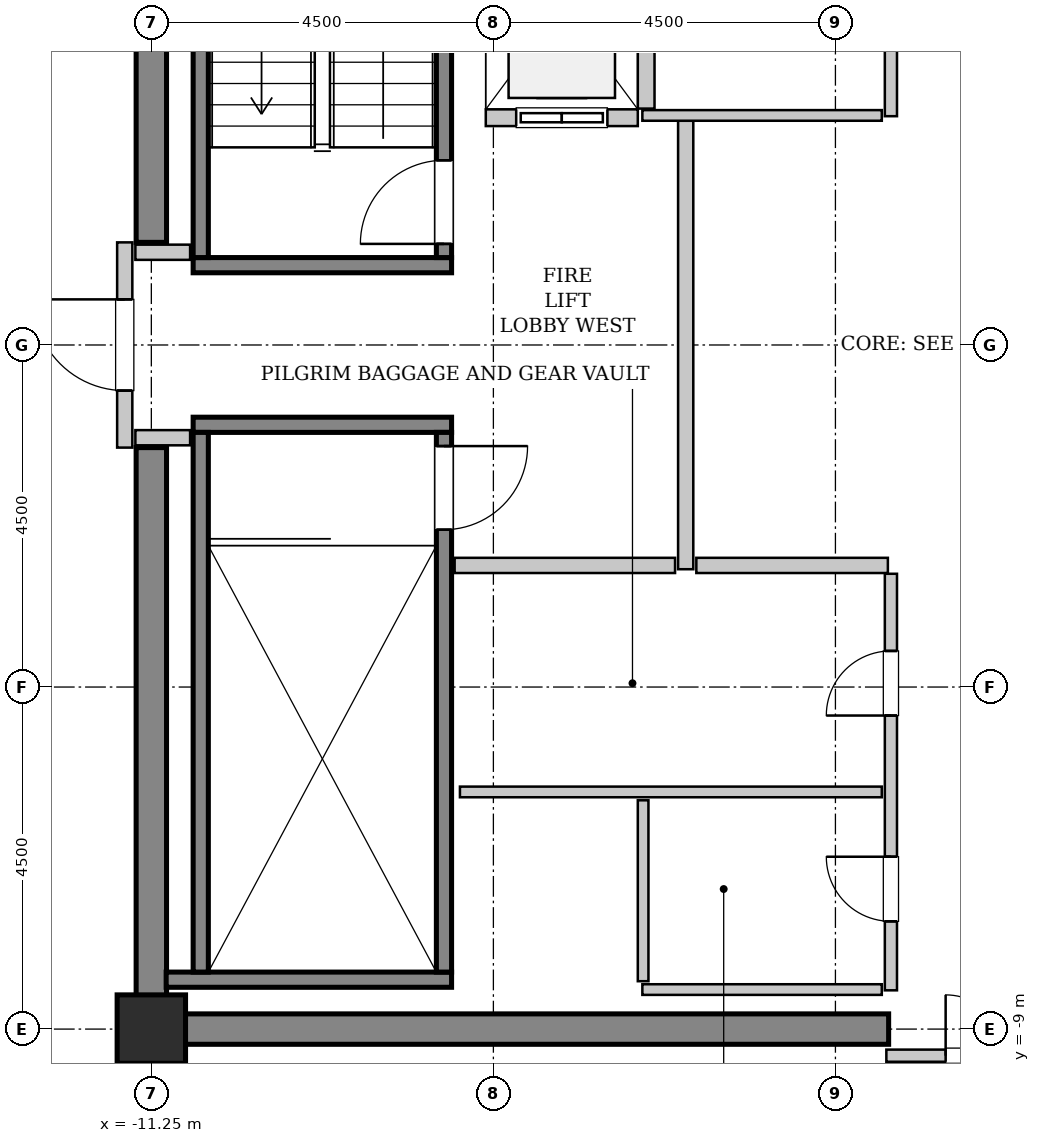
"""IFC4 building model, lengths in metres.
Left out: names, types, materials, properties, quantities, classifications, styles, units other than length and angle.
Written with IfcOpenShell. Run it as: python <this file> out.ifc"""

import sys

from ifc_helpers import new_model, si_unit, direction, frame, frame_2d, origin, origin_2d, place, context, subcontext, project, spatial, rectangle, extrude, source, transform, mapped, element, fill, save


model = new_model("IFC4")
c1 = context("Model", 3, precision=1e-05, world=origin(), true_north=direction((0.0, 1.0)))
c2 = subcontext(c1, "Body", "Model", "MODEL_VIEW")
j1 = project(units=[si_unit("LENGTHUNIT", "METRE"), si_unit("PLANEANGLEUNIT", "RADIAN")], contexts=[c1])
p1 = place(None, origin())
s1 = spatial("IfcSite", under=j1, at=p1, CompositionType="ELEMENT")
p2 = place(p1, origin())
s2 = spatial("IfcBuilding", under=s1, at=p2, CompositionType="ELEMENT")
p3 = place(p2, frame((0.0, 0.0, 353.8)))
s3 = spatial("IfcBuildingStorey", under=s2, at=p3, CompositionType="ELEMENT", Elevation=353.8)
m1 = source(origin(), c2, "Body", "SweptSolid", [
    extrude(rectangle(XDim=9.9, YDim=0.4, at=frame_2d((4.95, 0.0))), origin(), (0.0, 0.0, 1.0), 4.8),
])
p4 = place(p3, frame((-11.45, -9.0, 0.0), z_axis=(0.0, 0.0, 1.0), x_axis=(1.0, 0.0, 0.0)))
e1 = element("IfcWall", 1, at=p4, inside=s3, PredefinedType="SHEAR", context=c2, shape_type="MappedRepresentation", body=[
    mapped(m1, transform((0.0, 0.0, 0.0), x_axis=(1.0, 0.0, 0.0), y_axis=(0.0, 1.0, 0.0), z_axis=(0.0, 0.0, 1.0), scale=1.0)),
])
m2 = source(origin(), c2, "Body", "SweptSolid", [
    extrude(rectangle(XDim=7.45, YDim=0.4, at=frame_2d((3.725, 0.0))), origin(), (0.0, 0.0, 1.0), 4.8),
])
for number, where, z_axis, x_axis in (
    (2, (-11.25, -8.8, 0.0), (0.0, 0.0, 1.0), (0.0, 1.0, 0.0)),
    (3, (-11.25, 1.35, 0.0), (0.0, 0.0, 1.0), (0.0, 1.0, 0.0)),
):
    element("IfcWall", number, at=place(p3, frame(where, z_axis=z_axis, x_axis=x_axis)), inside=s3, PredefinedType="SHEAR", context=c2, shape_type="MappedRepresentation", body=[
        mapped(m2, transform((0.0, 0.0, 0.0), x_axis=(1.0, 0.0, 0.0), y_axis=(0.0, 1.0, 0.0), z_axis=(0.0, 0.0, 1.0), scale=1.0)),
    ])
m3 = source(origin(), c2, "Body", "SweptSolid", [
    extrude(rectangle(XDim=0.9, YDim=0.9, at=origin_2d()), origin(), (0.0, 0.0, 1.0), 4.8),
])
p5 = place(p3, frame((-11.25, -9.0, 0.0), z_axis=(0.0, 0.0, 1.0), x_axis=(1.0, 0.0, 0.0)))
e4 = element("IfcColumn", 4, at=p5, inside=s3, PredefinedType="COLUMN", context=c2, shape_type="MappedRepresentation", body=[
    mapped(m3, transform((0.0, 0.0, 0.0), x_axis=(1.0, 0.0, 0.0), y_axis=(0.0, 1.0, 0.0), z_axis=(0.0, 0.0, 1.0), scale=1.0)),
])
m4 = source(origin(), c2, "Body", "SweptSolid", [
    extrude(rectangle(XDim=3.4, YDim=0.2, at=frame_2d((1.7, 0.0))), origin(), (0.0, 0.0, 1.0), 4.8),
])
p6 = place(p3, frame((-7.3, 1.05, 0.0), z_axis=(0.0, 0.0, 1.0), x_axis=(-1.0, 0.0, 0.0)))
e5 = element("IfcWall", 5, at=p6, inside=s3, PredefinedType="SOLIDWALL", context=c2, shape_type="MappedRepresentation", body=[
    mapped(m4, transform((0.0, 0.0, 0.0), x_axis=(1.0, 0.0, 0.0), y_axis=(0.0, 1.0, 0.0), z_axis=(0.0, 0.0, 1.0), scale=1.0)),
])
m5 = source(origin(), c2, "Body", "SweptSolid", [
    extrude(rectangle(XDim=7.1, YDim=0.2, at=frame_2d((3.55, 0.0))), origin(), (0.0, 0.0, 1.0), 4.8),
])
p7 = place(p3, frame((-7.4, 1.15, 0.0), z_axis=(0.0, 0.0, 1.0), x_axis=(0.0, 1.0, 0.0)))
e6 = element("IfcWall", 6, at=p7, inside=s3, PredefinedType="SOLIDWALL", context=c2, shape_type="MappedRepresentation", body=[
    mapped(m5, transform((0.0, 0.0, 0.0), x_axis=(1.0, 0.0, 0.0), y_axis=(0.0, 1.0, 0.0), z_axis=(0.0, 0.0, 1.0), scale=1.0)),
])
p8 = place(p7, frame((0.18, 0.0, 0.0)))
e7 = element("IfcOpeningElement", 7, at=p8, cuts=e6, PredefinedType="OPENING", context=c2, shape_type="SweptSolid", body=[
    extrude(rectangle(XDim=1.1, YDim=2.15, at=frame_2d((0.55, 1.075))), frame((0.0, 0.11, 0.0), z_axis=(0.0, -1.0, 0.0), x_axis=(1.0, 0.0, 0.0)), (0.0, 0.0, 1.0), 0.22),
])
p9 = place(p3, frame((-10.6, 1.15, 0.0), z_axis=(0.0, 0.0, 1.0), x_axis=(0.0, 1.0, 0.0)))
e8 = element("IfcWall", 8, at=p9, inside=s3, PredefinedType="SOLIDWALL", context=c2, shape_type="MappedRepresentation", body=[
    mapped(m5, transform((0.0, 0.0, 0.0), x_axis=(1.0, 0.0, 0.0), y_axis=(0.0, 1.0, 0.0), z_axis=(0.0, 0.0, 1.0), scale=1.0)),
])
m6 = source(origin(), c2, "Body", "SweptSolid", [
    extrude(rectangle(XDim=3.4, YDim=0.2, at=frame_2d((1.7, 0.0))), origin(), (0.0, 0.0, 1.0), 4.5),
])
p10 = place(p3, frame((-10.7, -1.05, 0.0), z_axis=(0.0, 0.0, 1.0), x_axis=(1.0, 0.0, 0.0)))
e9 = element("IfcWall", 9, at=p10, inside=s3, PredefinedType="SOLIDWALL", context=c2, shape_type="MappedRepresentation", body=[
    mapped(m6, transform((0.0, 0.0, 0.0), x_axis=(1.0, 0.0, 0.0), y_axis=(0.0, 1.0, 0.0), z_axis=(0.0, 0.0, 1.0), scale=1.0)),
])
m7 = source(origin(), c2, "Body", "SweptSolid", [
    extrude(rectangle(XDim=3.755, YDim=0.2, at=frame_2d((1.877, 0.0))), origin(), (0.0, 0.0, 1.0), 4.5),
])
p11 = place(p3, frame((-11.055, -8.35, 0.0), z_axis=(0.0, 0.0, 1.0), x_axis=(1.0, 0.0, 0.0)))
e10 = element("IfcWall", 10, at=p11, inside=s3, PredefinedType="SOLIDWALL", context=c2, shape_type="MappedRepresentation", body=[
    mapped(m7, transform((0.0, 0.0, 0.0), x_axis=(1.0, 0.0, 0.0), y_axis=(0.0, 1.0, 0.0), z_axis=(0.0, 0.0, 1.0), scale=1.0)),
])
m8 = source(origin(), c2, "Body", "SweptSolid", [
    extrude(rectangle(XDim=7.1, YDim=0.2, at=frame_2d((3.55, 0.0))), origin(), (0.0, 0.0, 1.0), 4.5),
])
p12 = place(p3, frame((-10.6, -1.15, 0.0), z_axis=(0.0, 0.0, 1.0), x_axis=(0.0, -1.0, 0.0)))
e11 = element("IfcWall", 11, at=p12, inside=s3, PredefinedType="SOLIDWALL", context=c2, shape_type="MappedRepresentation", body=[
    mapped(m8, transform((0.0, 0.0, 0.0), x_axis=(1.0, 0.0, 0.0), y_axis=(0.0, 1.0, 0.0), z_axis=(0.0, 0.0, 1.0), scale=1.0)),
])
p13 = place(p3, frame((-7.4, -1.15, 0.0), z_axis=(0.0, 0.0, 1.0), x_axis=(0.0, -1.0, 0.0)))
e12 = element("IfcWall", 12, at=p13, inside=s3, PredefinedType="SOLIDWALL", context=c2, shape_type="MappedRepresentation", body=[
    mapped(m8, transform((0.0, 0.0, 0.0), x_axis=(1.0, 0.0, 0.0), y_axis=(0.0, 1.0, 0.0), z_axis=(0.0, 0.0, 1.0), scale=1.0)),
])
p14 = place(p13, frame((0.18, 0.0, 0.0)))
e13 = element("IfcOpeningElement", 13, at=p14, cuts=e12, PredefinedType="OPENING", context=c2, shape_type="SweptSolid", body=[
    extrude(rectangle(XDim=1.1, YDim=2.15, at=frame_2d((0.55, 1.075))), frame((0.0, 0.11, 0.0), z_axis=(0.0, -1.0, 0.0), x_axis=(1.0, 0.0, 0.0)), (0.0, 0.0, 1.0), 0.22),
])
m9 = source(origin(), c2, "Body", "SweptSolid", [
    extrude(rectangle(XDim=2.0, YDim=0.22, at=frame_2d((1.0, 0.0))), origin(), (0.0, 0.0, 1.0), 4.485),
])
p15 = place(p3, frame((-6.85, 2.99, 0.0), z_axis=(0.0, 0.0, 1.0), x_axis=(1.0, 0.0, 0.0)))
e14 = element("IfcWall", 14, at=p15, inside=s3, PredefinedType="SOLIDWALL", context=c2, shape_type="MappedRepresentation", body=[
    mapped(m9, transform((0.0, 0.0, 0.0), x_axis=(1.0, 0.0, 0.0), y_axis=(0.0, 1.0, 0.0), z_axis=(0.0, 0.0, 1.0), scale=1.0)),
])
p16 = place(p15, frame((0.4, 0.0, 0.0)))
e15 = element("IfcOpeningElement", 15, at=p16, cuts=e14, PredefinedType="OPENING", context=c2, shape_type="SweptSolid", body=[
    extrude(rectangle(XDim=1.2, YDim=2.2, at=frame_2d((0.6, 1.1))), frame((0.0, 0.12, 0.0), z_axis=(0.0, -1.0, 0.0), x_axis=(1.0, 0.0, 0.0)), (0.0, 0.0, 1.0), 0.24),
])
m10 = source(origin(), c2, "Body", "SweptSolid", [
    extrude(rectangle(XDim=2.68, YDim=0.22, at=frame_2d((1.34, 0.0))), origin(), (0.0, 0.0, 1.0), 4.485),
])
p17 = place(p3, frame((-4.74, 3.11, 0.0), z_axis=(0.0, 0.0, 1.0), x_axis=(0.0, 1.0, 0.0)))
e16 = element("IfcWall", 16, at=p17, inside=s3, PredefinedType="SOLIDWALL", context=c2, shape_type="MappedRepresentation", body=[
    mapped(m10, transform((0.0, 0.0, 0.0), x_axis=(1.0, 0.0, 0.0), y_axis=(0.0, 1.0, 0.0), z_axis=(0.0, 0.0, 1.0), scale=1.0)),
])
m11 = source(origin(), c2, "Body", "SweptSolid", [
    extrude(rectangle(XDim=2.7, YDim=0.2, at=frame_2d((1.35, 0.0))), origin(), (0.0, 0.0, 1.0), 3.575),
])
p18 = place(p3, frame((-11.6, -1.35, 0.0), z_axis=(0.0, 0.0, 1.0), x_axis=(0.0, 1.0, 0.0)))
e17 = element("IfcWall", 17, at=p18, inside=s3, PredefinedType="PARTITIONING", context=c2, shape_type="MappedRepresentation", body=[
    mapped(m11, transform((0.0, 0.0, 0.0), x_axis=(1.0, 0.0, 0.0), y_axis=(0.0, 1.0, 0.0), z_axis=(0.0, 0.0, 1.0), scale=1.0)),
])
p19 = place(p18, frame((0.75, 0.0, 0.0)))
e18 = element("IfcOpeningElement", 18, at=p19, cuts=e17, PredefinedType="OPENING", context=c2, shape_type="SweptSolid", body=[
    extrude(rectangle(XDim=1.2, YDim=2.15, at=frame_2d((0.6, 1.075))), frame((0.0, 0.11, 0.0), z_axis=(0.0, -1.0, 0.0), x_axis=(1.0, 0.0, 0.0)), (0.0, 0.0, 1.0), 0.22),
])
m12 = source(origin(), c2, "Body", "SweptSolid", [
    extrude(rectangle(XDim=5.9, YDim=0.2, at=frame_2d((2.95, 0.0))), origin(), (0.0, 0.0, 1.0), 4.485),
])
p20 = place(p3, frame((-4.22, -2.95, 0.0), z_axis=(0.0, 0.0, 1.0), x_axis=(0.0, 1.0, 0.0)))
e19 = element("IfcWall", 19, at=p20, inside=s3, PredefinedType="PARTITIONING", context=c2, shape_type="MappedRepresentation", body=[
    mapped(m12, transform((0.0, 0.0, 0.0), x_axis=(1.0, 0.0, 0.0), y_axis=(0.0, 1.0, 0.0), z_axis=(0.0, 0.0, 1.0), scale=1.0)),
])
m13 = source(origin(), c2, "Body", "SweptSolid", [
    extrude(rectangle(XDim=2.9, YDim=0.2, at=frame_2d((1.45, 0.0))), origin(), (0.0, 0.0, 1.0), 4.485),
])
p21 = place(p3, frame((-7.26, -2.9, 0.0), z_axis=(0.0, 0.0, 1.0), x_axis=(1.0, 0.0, 0.0)))
e20 = element("IfcWall", 20, at=p21, inside=s3, PredefinedType="PARTITIONING", context=c2, shape_type="MappedRepresentation", body=[
    mapped(m13, transform((0.0, 0.0, 0.0), x_axis=(1.0, 0.0, 0.0), y_axis=(0.0, 1.0, 0.0), z_axis=(0.0, 0.0, 1.0), scale=1.0)),
])
m14 = source(origin(), c2, "Body", "SweptSolid", [
    extrude(rectangle(XDim=2.52, YDim=0.2, at=frame_2d((1.26, 0.0))), origin(), (0.0, 0.0, 1.0), 4.485),
])
p22 = place(p3, frame((-4.08, -2.9, 0.0), z_axis=(0.0, 0.0, 1.0), x_axis=(1.0, 0.0, 0.0)))
e21 = element("IfcWall", 21, at=p22, inside=s3, PredefinedType="PARTITIONING", context=c2, shape_type="MappedRepresentation", body=[
    mapped(m14, transform((0.0, 0.0, 0.0), x_axis=(1.0, 0.0, 0.0), y_axis=(0.0, 1.0, 0.0), z_axis=(0.0, 0.0, 1.0), scale=1.0)),
])
m15 = source(origin(), c2, "Body", "SweptSolid", [
    extrude(rectangle(XDim=0.72, YDim=0.2, at=frame_2d((0.36, 0.0))), origin(), (0.0, 0.0, 1.0), 4.485),
])
for number, where, z_axis, x_axis in (
    (22, (-11.46, 1.22, 0.0), (0.0, 0.0, 1.0), (1.0, 0.0, 0.0)),
    (23, (-11.46, -1.22, 0.0), (0.0, 0.0, 1.0), (1.0, 0.0, 0.0)),
):
    element("IfcWall", number, at=place(p3, frame(where, z_axis=z_axis, x_axis=x_axis)), inside=s3, PredefinedType="PARTITIONING", context=c2, shape_type="MappedRepresentation", body=[
        mapped(m15, transform((0.0, 0.0, 0.0), x_axis=(1.0, 0.0, 0.0), y_axis=(0.0, 1.0, 0.0), z_axis=(0.0, 0.0, 1.0), scale=1.0)),
    ])
m16 = source(origin(), c2, "Body", "SweptSolid", [
    extrude(rectangle(XDim=3.16, YDim=0.16, at=frame_2d((1.58, 0.0))), origin(), (0.0, 0.0, 1.0), 3.575),
])
p23 = place(p3, frame((-1.58, -9.35, 0.0), z_axis=(0.0, 0.0, 1.0), x_axis=(1.0, 0.0, 0.0)))
e24 = element("IfcWall", 24, at=p23, inside=s3, PredefinedType="PARTITIONING", context=c2, shape_type="MappedRepresentation", body=[
    mapped(m16, transform((0.0, 0.0, 0.0), x_axis=(1.0, 0.0, 0.0), y_axis=(0.0, 1.0, 0.0), z_axis=(0.0, 0.0, 1.0), scale=1.0)),
])
p24 = place(p23, frame((0.78, 0.0, 0.0)))
e25 = element("IfcOpeningElement", 25, at=p24, cuts=e24, PredefinedType="OPENING", context=c2, shape_type="SweptSolid", body=[
    extrude(rectangle(XDim=1.6, YDim=2.3, at=frame_2d((0.8, 1.15))), frame((0.0, 0.09, 0.0), z_axis=(0.0, -1.0, 0.0), x_axis=(1.0, 0.0, 0.0)), (0.0, 0.0, 1.0), 0.18),
])
m17 = source(origin(), c2, "Body", "SweptSolid", [
    extrude(rectangle(XDim=5.48, YDim=0.16, at=frame_2d((2.74, 0.0))), origin(), (0.0, 0.0, 1.0), 4.485),
])
p25 = place(p3, frame((-1.52, 3.01, 0.0), z_axis=(0.0, 0.0, 1.0), x_axis=(0.0, 1.0, 0.0)))
e26 = element("IfcWall", 26, at=p25, inside=s3, PredefinedType="PARTITIONING", context=c2, shape_type="MappedRepresentation", body=[
    mapped(m17, transform((0.0, 0.0, 0.0), x_axis=(1.0, 0.0, 0.0), y_axis=(0.0, 1.0, 0.0), z_axis=(0.0, 0.0, 1.0), scale=1.0)),
])
p26 = place(p25, frame((2.315, 0.0, 0.0)))
e27 = element("IfcOpeningElement", 27, at=p26, cuts=e26, PredefinedType="OPENING", context=c2, shape_type="SweptSolid", body=[
    extrude(rectangle(XDim=0.85, YDim=2.1, at=frame_2d((0.425, 1.05))), frame((0.0, 0.09, 0.0), z_axis=(0.0, -1.0, 0.0), x_axis=(1.0, 0.0, 0.0)), (0.0, 0.0, 1.0), 0.18),
])
m18 = source(origin(), c2, "Body", "SweptSolid", [
    extrude(rectangle(XDim=3.15, YDim=0.14, at=frame_2d((1.575, 0.0))), origin(), (0.0, 0.0, 1.0), 4.485),
])
p27 = place(p3, frame((-4.79, 3.02, 0.0), z_axis=(0.0, 0.0, 1.0), x_axis=(1.0, 0.0, 0.0)))
e28 = element("IfcWall", 28, at=p27, inside=s3, PredefinedType="PARTITIONING", context=c2, shape_type="MappedRepresentation", body=[
    mapped(m18, transform((0.0, 0.0, 0.0), x_axis=(1.0, 0.0, 0.0), y_axis=(0.0, 1.0, 0.0), z_axis=(0.0, 0.0, 1.0), scale=1.0)),
])
p28 = place(p3, frame((-1.52, -8.49, 0.0), z_axis=(0.0, 0.0, 1.0), x_axis=(0.0, 1.0, 0.0)))
e29 = element("IfcWall", 29, at=p28, inside=s3, PredefinedType="PARTITIONING", context=c2, shape_type="MappedRepresentation", body=[
    mapped(m17, transform((0.0, 0.0, 0.0), x_axis=(1.0, 0.0, 0.0), y_axis=(0.0, 1.0, 0.0), z_axis=(0.0, 0.0, 1.0), scale=1.0)),
])
p29 = place(p28, frame((0.907, 0.0, 0.0)))
e30 = element("IfcOpeningElement", 30, at=p29, cuts=e29, PredefinedType="OPENING", context=c2, shape_type="SweptSolid", body=[
    extrude(rectangle(XDim=0.85, YDim=2.1, at=frame_2d((0.425, 1.05))), frame((0.0, 0.09, 0.0), z_axis=(0.0, -1.0, 0.0), x_axis=(1.0, 0.0, 0.0)), (0.0, 0.0, 1.0), 0.18),
])
p30 = place(p28, frame((3.615, 0.0, 0.0)))
e31 = element("IfcOpeningElement", 31, at=p30, cuts=e29, PredefinedType="OPENING", context=c2, shape_type="SweptSolid", body=[
    extrude(rectangle(XDim=0.85, YDim=2.1, at=frame_2d((0.425, 1.05))), frame((0.0, 0.09, 0.0), z_axis=(0.0, -1.0, 0.0), x_axis=(1.0, 0.0, 0.0)), (0.0, 0.0, 1.0), 0.18),
])
m19 = source(origin(), c2, "Body", "SweptSolid", [
    extrude(rectangle(XDim=5.55, YDim=0.14, at=frame_2d((2.775, 0.0))), origin(), (0.0, 0.0, 1.0), 4.485),
])
p31 = place(p3, frame((-7.19, -5.88, 0.0), z_axis=(0.0, 0.0, 1.0), x_axis=(1.0, 0.0, 0.0)))
e32 = element("IfcWall", 32, at=p31, inside=s3, PredefinedType="PARTITIONING", context=c2, shape_type="MappedRepresentation", body=[
    mapped(m19, transform((0.0, 0.0, 0.0), x_axis=(1.0, 0.0, 0.0), y_axis=(0.0, 1.0, 0.0), z_axis=(0.0, 0.0, 1.0), scale=1.0)),
])
p32 = place(p3, frame((-4.79, -8.48, 0.0), z_axis=(0.0, 0.0, 1.0), x_axis=(1.0, 0.0, 0.0)))
e33 = element("IfcWall", 33, at=p32, inside=s3, PredefinedType="PARTITIONING", context=c2, shape_type="MappedRepresentation", body=[
    mapped(m18, transform((0.0, 0.0, 0.0), x_axis=(1.0, 0.0, 0.0), y_axis=(0.0, 1.0, 0.0), z_axis=(0.0, 0.0, 1.0), scale=1.0)),
])
m20 = source(origin(), c2, "Body", "SweptSolid", [
    extrude(rectangle(XDim=2.38, YDim=0.14, at=frame_2d((1.19, 0.0))), origin(), (0.0, 0.0, 1.0), 4.485),
])
p33 = place(p3, frame((-4.78, -8.37, 0.0), z_axis=(0.0, 0.0, 1.0), x_axis=(0.0, 1.0, 0.0)))
e34 = element("IfcWall", 34, at=p33, inside=s3, PredefinedType="PARTITIONING", context=c2, shape_type="MappedRepresentation", body=[
    mapped(m20, transform((0.0, 0.0, 0.0), x_axis=(1.0, 0.0, 0.0), y_axis=(0.0, 1.0, 0.0), z_axis=(0.0, 0.0, 1.0), scale=1.0)),
])
m21 = source(origin(), c2, "Body", "SweptSolid", [
    extrude(rectangle(XDim=1.1, YDim=2.15, at=frame_2d((0.55, 1.075))), frame((0.0, 0.025, 0.0), z_axis=(0.0, -1.0, 0.0), x_axis=(1.0, 0.0, 0.0)), (0.0, 0.0, 1.0), 0.05),
])
p34 = place(p8, origin())
e35 = element("IfcDoor", 35, at=p34, inside=s3, OperationType="SINGLE_SWING_LEFT", PredefinedType="DOOR", context=c2, shape_type="MappedRepresentation", body=[
    mapped(m21, transform((0.0, 0.0, 0.0), x_axis=(1.0, 0.0, 0.0), y_axis=(0.0, 1.0, 0.0), z_axis=(0.0, 0.0, 1.0), scale=1.0)),
])
fill(e7, e35)
p35 = place(p14, origin())
e36 = element("IfcDoor", 36, at=p35, inside=s3, OperationType="SINGLE_SWING_LEFT", PredefinedType="DOOR", context=c2, shape_type="MappedRepresentation", body=[
    mapped(m21, transform((0.0, 0.0, 0.0), x_axis=(1.0, 0.0, 0.0), y_axis=(0.0, 1.0, 0.0), z_axis=(0.0, 0.0, 1.0), scale=1.0)),
])
fill(e13, e36)
m22 = source(origin(), c2, "Body", "SweptSolid", [
    extrude(rectangle(XDim=1.2, YDim=2.2, at=frame_2d((0.6, 1.1))), frame((0.0, 0.025, 0.0), z_axis=(0.0, -1.0, 0.0), x_axis=(1.0, 0.0, 0.0)), (0.0, 0.0, 1.0), 0.05),
])
p36 = place(p16, origin())
e37 = element("IfcDoor", 37, at=p36, inside=s3, OperationType="SLIDING_TO_LEFT", PredefinedType="DOOR", context=c2, shape_type="MappedRepresentation", body=[
    mapped(m22, transform((0.0, 0.0, 0.0), x_axis=(1.0, 0.0, 0.0), y_axis=(0.0, 1.0, 0.0), z_axis=(0.0, 0.0, 1.0), scale=1.0)),
])
fill(e15, e37)
m23 = source(origin(), c2, "Body", "SweptSolid", [
    extrude(rectangle(XDim=1.2, YDim=2.15, at=frame_2d((0.6, 1.075))), frame((0.0, 0.025, 0.0), z_axis=(0.0, -1.0, 0.0), x_axis=(1.0, 0.0, 0.0)), (0.0, 0.0, 1.0), 0.05),
])
p37 = place(p19, origin())
e38 = element("IfcDoor", 38, at=p37, inside=s3, OperationType="SINGLE_SWING_RIGHT", PredefinedType="DOOR", context=c2, shape_type="MappedRepresentation", body=[
    mapped(m23, transform((0.0, 0.0, 0.0), x_axis=(1.0, 0.0, 0.0), y_axis=(0.0, 1.0, 0.0), z_axis=(0.0, 0.0, 1.0), scale=1.0)),
])
fill(e18, e38)
m24 = source(origin(), c2, "Body", "SweptSolid", [
    extrude(rectangle(XDim=1.6, YDim=2.3, at=frame_2d((0.8, 1.15))), frame((0.0, 0.025, 0.0), z_axis=(0.0, -1.0, 0.0), x_axis=(1.0, 0.0, 0.0)), (0.0, 0.0, 1.0), 0.05),
])
p38 = place(p24, origin())
e39 = element("IfcDoor", 39, at=p38, inside=s3, OperationType="DOUBLE_DOOR_SINGLE_SWING", PredefinedType="DOOR", context=c2, shape_type="MappedRepresentation", body=[
    mapped(m24, transform((0.0, 0.0, 0.0), x_axis=(1.0, 0.0, 0.0), y_axis=(0.0, 1.0, 0.0), z_axis=(0.0, 0.0, 1.0), scale=1.0)),
])
fill(e25, e39)
m25 = source(origin(), c2, "Body", "SweptSolid", [
    extrude(rectangle(XDim=0.85, YDim=2.1, at=frame_2d((0.425, 1.05))), frame((0.0, 0.025, 0.0), z_axis=(0.0, -1.0, 0.0), x_axis=(1.0, 0.0, 0.0)), (0.0, 0.0, 1.0), 0.05),
])
p39 = place(p29, origin())
e40 = element("IfcDoor", 40, at=p39, inside=s3, OperationType="SINGLE_SWING_RIGHT", PredefinedType="DOOR", context=c2, shape_type="MappedRepresentation", body=[
    mapped(m25, transform((0.0, 0.0, 0.0), x_axis=(1.0, 0.0, 0.0), y_axis=(0.0, 1.0, 0.0), z_axis=(0.0, 0.0, 1.0), scale=1.0)),
])
fill(e30, e40)
p40 = place(p30, origin())
e41 = element("IfcDoor", 41, at=p40, inside=s3, OperationType="SINGLE_SWING_LEFT", PredefinedType="DOOR", context=c2, shape_type="MappedRepresentation", body=[
    mapped(m25, transform((0.0, 0.0, 0.0), x_axis=(1.0, 0.0, 0.0), y_axis=(0.0, 1.0, 0.0), z_axis=(0.0, 0.0, 1.0), scale=1.0)),
])
fill(e31, e41)
save(model, sys.argv[1])
